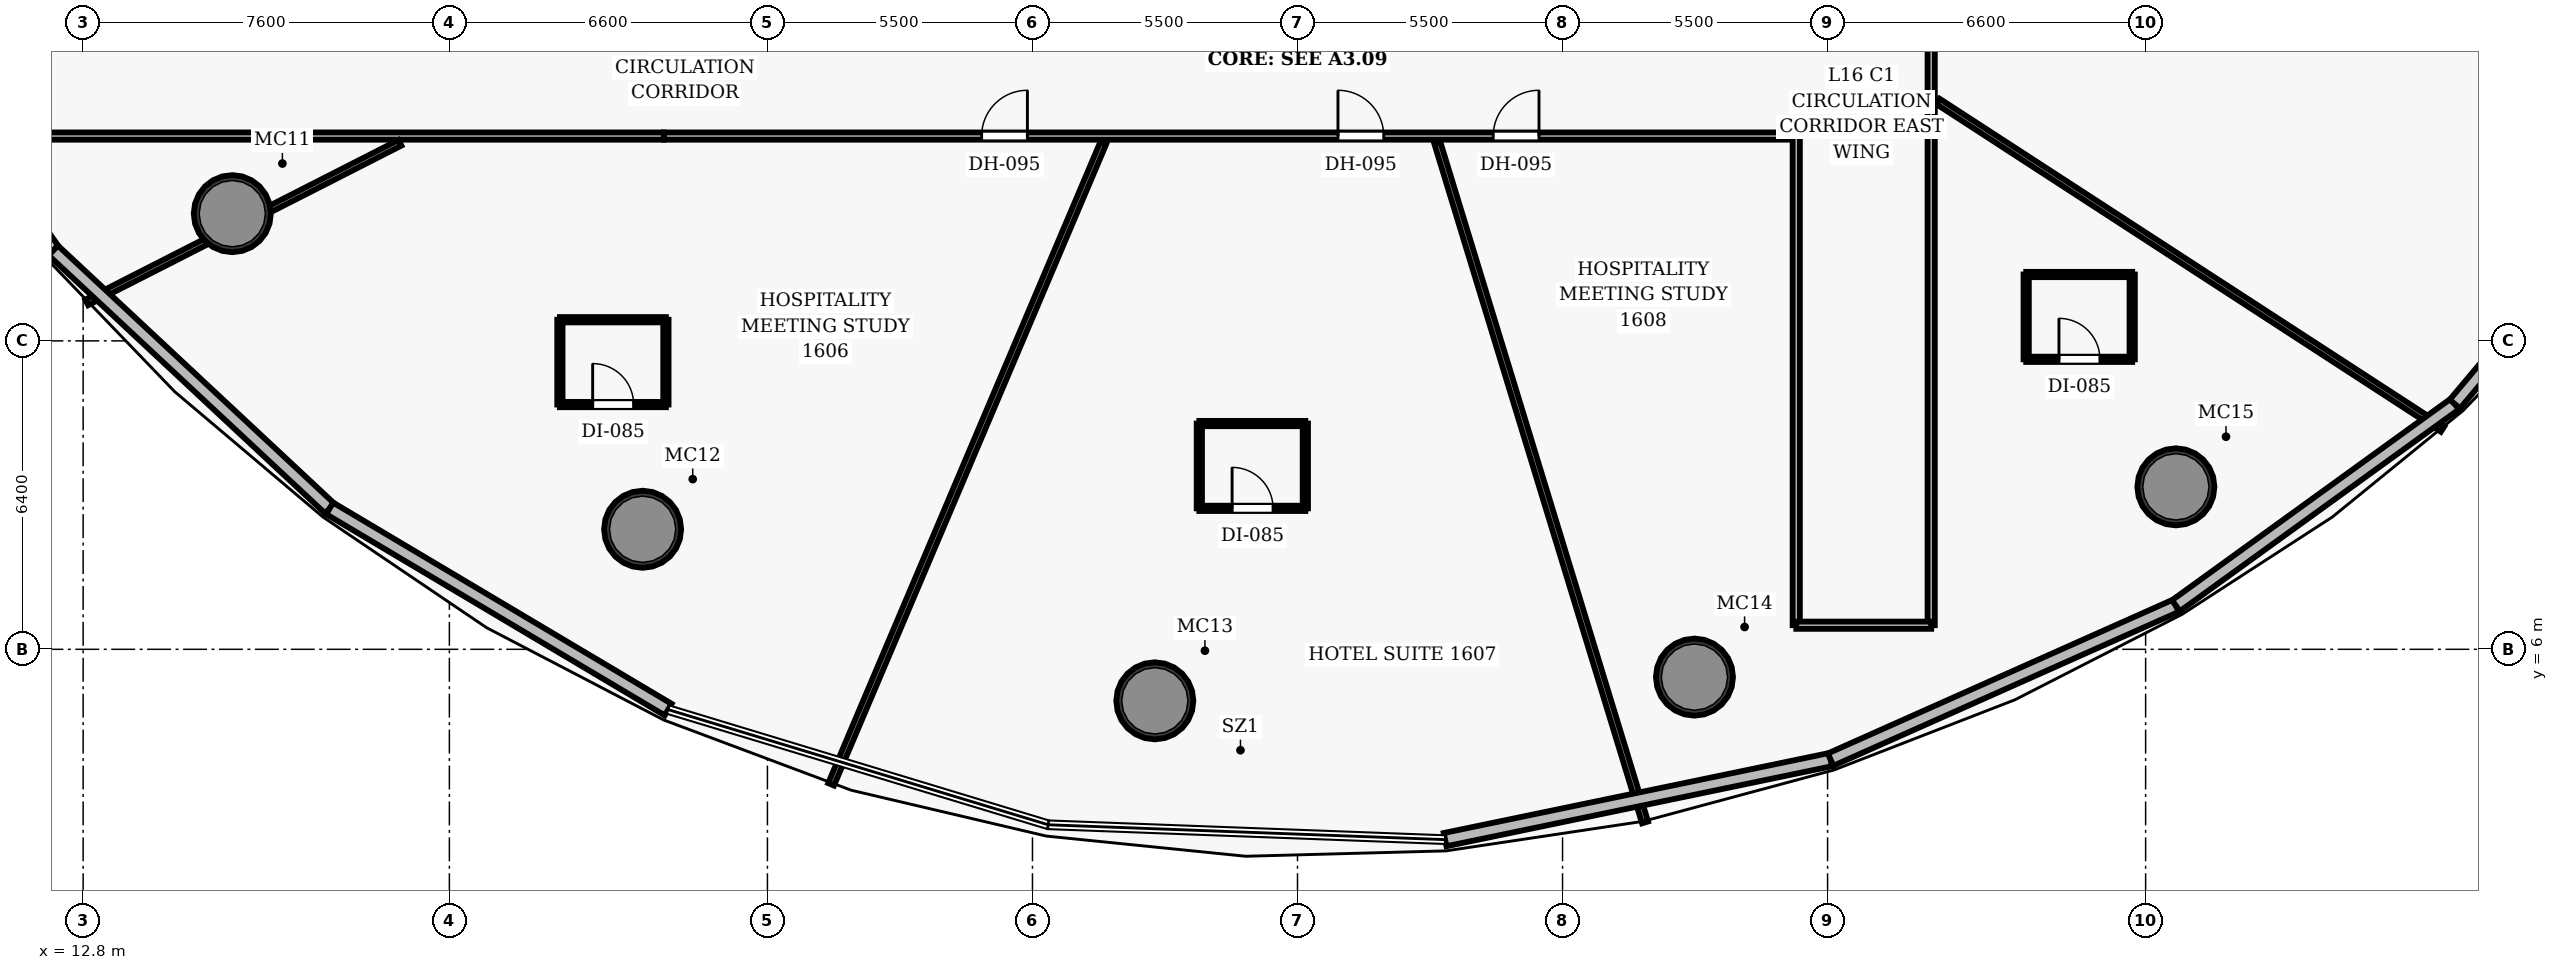
"""IFC4 building model, lengths in metres.
Left out: names, types, materials, properties, quantities, classifications, styles, units other than length and angle.
Written with IfcOpenShell. Run it as: python <this file> out.ifc"""

import sys

from ifc_helpers import new_model, si_unit, direction, frame, frame_2d, origin, origin_2d, place, context, subcontext, project, spatial, rectangle, hollow_circle, extrude, element, fill, save


model = new_model("IFC4")
c1 = context("Model", 3, precision=1e-05, world=origin(), true_north=direction((0.0, 1.0)))
c2 = subcontext(c1, "Body", "Model", "MODEL_VIEW")
j1 = project(units=[si_unit("LENGTHUNIT", "METRE"), si_unit("PLANEANGLEUNIT", "RADIAN")], contexts=[c1])
p1 = place(None, origin())
s1 = spatial("IfcSite", under=j1, at=p1, CompositionType="ELEMENT")
p2 = place(p1, origin())
s2 = spatial("IfcBuilding", under=s1, at=p2, CompositionType="ELEMENT")
p3 = place(p2, frame((0.0, 0.0, 72.9)))
s3 = spatial("IfcBuildingStorey", under=s2, at=p3, CompositionType="ELEMENT", Elevation=72.9)
for number, where, z_axis, x_axis in (
    (1, (15.895, 15.04, 0.0), (0.0, 0.0, 1.0), (1.0, 0.0, 0.0)),
    (2, (24.41, 8.491, 0.0), (0.0, 0.0, 1.0), (1.0, 0.0, 0.0)),
    (3, (35.039, 4.931, 0.0), (0.0, 0.0, 1.0), (1.0, 0.0, 0.0)),
    (4, (46.238, 5.423, 0.0), (0.0, 0.0, 1.0), (1.0, 0.0, 0.0)),
    (5, (56.228, 9.371, 0.0), (0.0, 0.0, 1.0), (1.0, 0.0, 0.0)),
):
    element("IfcColumn", number, at=place(p3, frame(where, z_axis=z_axis, x_axis=x_axis)), inside=s3, PredefinedType="COLUMN", context=c2, shape_type="SweptSolid", body=[
        extrude(hollow_circle(Radius=0.8, WallThickness=0.06, at=origin_2d()), origin(), (0.0, 0.0, 1.0), 3.5),
    ])
p4 = place(p3, frame((24.85, 16.65, 0.0), z_axis=(0.0, 0.0, 1.0), x_axis=(1.0, 0.0, 0.0)))
e6 = element("IfcWall", 6, at=p4, inside=s3, PredefinedType="PARTITIONING", context=c2, shape_type="SweptSolid", body=[
    extrude(rectangle(XDim=23.5, YDim=0.15, at=frame_2d((11.75, 0.0))), origin(), (0.0, 0.0, 1.0), 2.6),
])
p5 = place(p4, frame((6.595, 0.0, 0.0)))
e7 = element("IfcOpeningElement", 7, at=p5, cuts=e6, PredefinedType="OPENING", context=c2, shape_type="SweptSolid", body=[
    extrude(rectangle(XDim=0.95, YDim=2.15, at=frame_2d((0.475, 1.075))), frame((0.0, 0.085, 0.0), z_axis=(0.0, -1.0, 0.0), x_axis=(1.0, 0.0, 0.0)), (0.0, 0.0, 1.0), 0.17),
])
p6 = place(p4, frame((13.99, 0.0, 0.0)))
e8 = element("IfcOpeningElement", 8, at=p6, cuts=e6, PredefinedType="OPENING", context=c2, shape_type="SweptSolid", body=[
    extrude(rectangle(XDim=0.95, YDim=2.15, at=frame_2d((0.475, 1.075))), frame((0.0, 0.085, 0.0), z_axis=(0.0, -1.0, 0.0), x_axis=(1.0, 0.0, 0.0)), (0.0, 0.0, 1.0), 0.17),
])
p7 = place(p4, frame((17.211, 0.0, 0.0)))
e9 = element("IfcOpeningElement", 9, at=p7, cuts=e6, PredefinedType="OPENING", context=c2, shape_type="SweptSolid", body=[
    extrude(rectangle(XDim=0.95, YDim=2.15, at=frame_2d((0.475, 1.075))), frame((0.0, 0.085, 0.0), z_axis=(0.0, -1.0, 0.0), x_axis=(1.0, 0.0, 0.0)), (0.0, 0.0, 1.0), 0.17),
])
p8 = place(p3, frame((51.15, 16.65, 0.0), z_axis=(0.0, 0.0, 1.0), x_axis=(0.0, 1.0, 0.0)))
e10 = element("IfcWall", 10, at=p8, inside=s3, PredefinedType="PARTITIONING", context=c2, shape_type="SweptSolid", body=[
    extrude(rectangle(XDim=15.9, YDim=0.15, at=frame_2d((7.95, 0.0))), origin(), (0.0, 0.0, 1.0), 2.6),
])
p9 = place(p8, frame((11.512, 0.0, 0.0)))
e11 = element("IfcOpeningElement", 11, at=p9, cuts=e10, PredefinedType="OPENING", context=c2, shape_type="SweptSolid", body=[
    extrude(rectangle(XDim=0.95, YDim=2.15, at=frame_2d((0.475, 1.075))), frame((0.0, 0.085, 0.0), z_axis=(0.0, -1.0, 0.0), x_axis=(1.0, 0.0, 0.0)), (0.0, 0.0, 1.0), 0.17),
])
p10 = place(p8, frame((7.004, 0.0, 0.0)))
e12 = element("IfcOpeningElement", 12, at=p10, cuts=e10, PredefinedType="OPENING", context=c2, shape_type="SweptSolid", body=[
    extrude(rectangle(XDim=0.95, YDim=2.15, at=frame_2d((0.475, 1.075))), frame((0.0, 0.085, 0.0), z_axis=(0.0, -1.0, 0.0), x_axis=(1.0, 0.0, 0.0)), (0.0, 0.0, 1.0), 0.17),
])
p11 = place(p3, frame((11.124, 16.65, 0.0), z_axis=(0.0, 0.0, 1.0), x_axis=(1.0, 0.0, 0.0)))
e13 = element("IfcWall", 13, at=p11, inside=s3, PredefinedType="PARTITIONING", context=c2, shape_type="SweptSolid", body=[
    extrude(rectangle(XDim=13.726, YDim=0.15, at=frame_2d((6.863, 0.0))), origin(), (0.0, 0.0, 1.0), 2.6),
])
for number, where, z_axis, x_axis in (
    (14, (48.35, 6.5, 0.0), (0.0, 0.0, 1.0), (0.0, 1.0, 0.0)),
    (15, (51.15, 6.5, 0.0), (0.0, 0.0, 1.0), (0.0, 1.0, 0.0)),
):
    element("IfcWall", number, at=place(p3, frame(where, z_axis=z_axis, x_axis=x_axis)), inside=s3, PredefinedType="PARTITIONING", context=c2, shape_type="SweptSolid", body=[
        extrude(rectangle(XDim=10.15, YDim=0.15, at=frame_2d((5.075, 0.0))), origin(), (0.0, 0.0, 1.0), 2.6),
    ])
p12 = place(p3, frame((48.35, 6.5, 0.0), z_axis=(0.0, 0.0, 1.0), x_axis=(1.0, 0.0, 0.0)))
e16 = element("IfcWall", 16, at=p12, inside=s3, PredefinedType="PARTITIONING", context=c2, shape_type="SweptSolid", body=[
    extrude(rectangle(XDim=2.8, YDim=0.15, at=frame_2d((1.4, 0.0))), origin(), (0.0, 0.0, 1.0), 2.6),
])
p13 = place(p3, frame((19.375, 16.51, 0.0), z_axis=(0.0, 0.0, 1.0), x_axis=(-0.891001184566, -0.454000979185, 0.0)))
e17 = element("IfcWall", 17, at=p13, inside=s3, PredefinedType="PARTITIONING", context=c2, shape_type="SweptSolid", body=[
    extrude(rectangle(XDim=7.295, YDim=0.13, at=frame_2d((3.647, 0.0))), origin(), (0.0, 0.0, 1.0), 2.6),
])
p14 = place(p3, frame((33.972, 16.51, 0.0), z_axis=(0.0, 0.0, 1.0), x_axis=(-0.390718056451, -0.920510402094, 0.0)))
e18 = element("IfcWall", 18, at=p14, inside=s3, PredefinedType="PARTITIONING", context=c2, shape_type="SweptSolid", body=[
    extrude(rectangle(XDim=14.462, YDim=0.13, at=frame_2d((7.231, 0.0))), origin(), (0.0, 0.0, 1.0), 2.6),
])
p15 = place(p3, frame((40.901, 16.51, 0.0), z_axis=(0.0, 0.0, 1.0), x_axis=(0.292367012645, -0.956306190463, 0.0)))
e19 = element("IfcWall", 19, at=p15, inside=s3, PredefinedType="PARTITIONING", context=c2, shape_type="SweptSolid", body=[
    extrude(rectangle(XDim=14.746, YDim=0.13, at=frame_2d((7.373, 0.0))), origin(), (0.0, 0.0, 1.0), 2.6),
])
p16 = place(p3, frame((51.29, 17.369, 0.0), z_axis=(0.0, 0.0, 1.0), x_axis=(0.838674055508, -0.544633664602, 0.0)))
e20 = element("IfcWall", 20, at=p16, inside=s3, PredefinedType="PARTITIONING", context=c2, shape_type="SweptSolid", body=[
    extrude(rectangle(XDim=12.486, YDim=0.13, at=frame_2d((6.243, 0.0))), origin(), (0.0, 0.0, 1.0), 2.6),
])
p17 = place(p3, frame((22.693, 11.079, 0.0), z_axis=(0.0, 0.0, 1.0), x_axis=(1.0, 0.0, 0.0)))
e21 = element("IfcWall", 21, at=p17, inside=s3, PredefinedType="PARTITIONING", context=c2, shape_type="SweptSolid", body=[
    extrude(rectangle(XDim=2.2, YDim=0.11, at=frame_2d((1.1, 0.0))), origin(), (0.0, 0.0, 1.0), 2.6),
])
p18 = place(p17, frame((0.68, 0.0, 0.0)))
e22 = element("IfcOpeningElement", 22, at=p18, cuts=e21, PredefinedType="OPENING", context=c2, shape_type="SweptSolid", body=[
    extrude(rectangle(XDim=0.85, YDim=2.1, at=frame_2d((0.425, 1.05))), frame((0.0, 0.065, 0.0), z_axis=(0.0, -1.0, 0.0), x_axis=(1.0, 0.0, 0.0)), (0.0, 0.0, 1.0), 0.13),
])
p19 = place(p3, frame((22.693, 12.839, 0.0), z_axis=(0.0, 0.0, 1.0), x_axis=(1.0, 0.0, 0.0)))
e23 = element("IfcWall", 23, at=p19, inside=s3, PredefinedType="PARTITIONING", context=c2, shape_type="SweptSolid", body=[
    extrude(rectangle(XDim=2.2, YDim=0.11, at=frame_2d((1.1, 0.0))), origin(), (0.0, 0.0, 1.0), 2.6),
])
for number, where, z_axis, x_axis in (
    (24, (22.693, 11.079, 0.0), (0.0, 0.0, 1.0), (0.0, 1.0, 0.0)),
    (25, (24.893, 11.079, 0.0), (0.0, 0.0, 1.0), (0.0, 1.0, 0.0)),
):
    element("IfcWall", number, at=place(p3, frame(where, z_axis=z_axis, x_axis=x_axis)), inside=s3, PredefinedType="PARTITIONING", context=c2, shape_type="SweptSolid", body=[
        extrude(rectangle(XDim=1.76, YDim=0.11, at=frame_2d((0.88, 0.0))), origin(), (0.0, 0.0, 1.0), 2.6),
    ])
p20 = place(p3, frame((35.963, 8.925, 0.0), z_axis=(0.0, 0.0, 1.0), x_axis=(1.0, 0.0, 0.0)))
e26 = element("IfcWall", 26, at=p20, inside=s3, PredefinedType="PARTITIONING", context=c2, shape_type="SweptSolid", body=[
    extrude(rectangle(XDim=2.2, YDim=0.11, at=frame_2d((1.1, 0.0))), origin(), (0.0, 0.0, 1.0), 2.6),
])
p21 = place(p20, frame((0.68, 0.0, 0.0)))
e27 = element("IfcOpeningElement", 27, at=p21, cuts=e26, PredefinedType="OPENING", context=c2, shape_type="SweptSolid", body=[
    extrude(rectangle(XDim=0.85, YDim=2.1, at=frame_2d((0.425, 1.05))), frame((0.0, 0.065, 0.0), z_axis=(0.0, -1.0, 0.0), x_axis=(1.0, 0.0, 0.0)), (0.0, 0.0, 1.0), 0.13),
])
p22 = place(p3, frame((35.963, 10.685, 0.0), z_axis=(0.0, 0.0, 1.0), x_axis=(1.0, 0.0, 0.0)))
e28 = element("IfcWall", 28, at=p22, inside=s3, PredefinedType="PARTITIONING", context=c2, shape_type="SweptSolid", body=[
    extrude(rectangle(XDim=2.2, YDim=0.11, at=frame_2d((1.1, 0.0))), origin(), (0.0, 0.0, 1.0), 2.6),
])
for number, where, z_axis, x_axis in (
    (29, (35.963, 8.925, 0.0), (0.0, 0.0, 1.0), (0.0, 1.0, 0.0)),
    (30, (38.163, 8.925, 0.0), (0.0, 0.0, 1.0), (0.0, 1.0, 0.0)),
):
    element("IfcWall", number, at=place(p3, frame(where, z_axis=z_axis, x_axis=x_axis)), inside=s3, PredefinedType="PARTITIONING", context=c2, shape_type="SweptSolid", body=[
        extrude(rectangle(XDim=1.76, YDim=0.11, at=frame_2d((0.88, 0.0))), origin(), (0.0, 0.0, 1.0), 2.6),
    ])
p23 = place(p3, frame((53.122, 12.017, 0.0), z_axis=(0.0, 0.0, 1.0), x_axis=(1.0, 0.0, 0.0)))
e31 = element("IfcWall", 31, at=p23, inside=s3, PredefinedType="PARTITIONING", context=c2, shape_type="SweptSolid", body=[
    extrude(rectangle(XDim=2.2, YDim=0.11, at=frame_2d((1.1, 0.0))), origin(), (0.0, 0.0, 1.0), 2.6),
])
p24 = place(p23, frame((0.68, 0.0, 0.0)))
e32 = element("IfcOpeningElement", 32, at=p24, cuts=e31, PredefinedType="OPENING", context=c2, shape_type="SweptSolid", body=[
    extrude(rectangle(XDim=0.85, YDim=2.1, at=frame_2d((0.425, 1.05))), frame((0.0, 0.065, 0.0), z_axis=(0.0, -1.0, 0.0), x_axis=(1.0, 0.0, 0.0)), (0.0, 0.0, 1.0), 0.13),
])
p25 = place(p3, frame((53.122, 13.777, 0.0), z_axis=(0.0, 0.0, 1.0), x_axis=(1.0, 0.0, 0.0)))
e33 = element("IfcWall", 33, at=p25, inside=s3, PredefinedType="PARTITIONING", context=c2, shape_type="SweptSolid", body=[
    extrude(rectangle(XDim=2.2, YDim=0.11, at=frame_2d((1.1, 0.0))), origin(), (0.0, 0.0, 1.0), 2.6),
])
for number, where, z_axis, x_axis in (
    (34, (53.122, 12.017, 0.0), (0.0, 0.0, 1.0), (0.0, 1.0, 0.0)),
    (35, (55.322, 12.017, 0.0), (0.0, 0.0, 1.0), (0.0, 1.0, 0.0)),
):
    element("IfcWall", number, at=place(p3, frame(where, z_axis=z_axis, x_axis=x_axis)), inside=s3, PredefinedType="PARTITIONING", context=c2, shape_type="SweptSolid", body=[
        extrude(rectangle(XDim=1.76, YDim=0.11, at=frame_2d((0.88, 0.0))), origin(), (0.0, 0.0, 1.0), 2.6),
    ])
p26 = place(p3, frame((12.18, 14.276, 0.0), z_axis=(0.0, 0.0, 1.0), x_axis=(-0.575543356888, 0.817771266518, 0.0)))
e36 = element("IfcWall", 36, at=p26, inside=s3, PredefinedType="SOLIDWALL", context=c2, shape_type="SweptSolid", body=[
    extrude(rectangle(XDim=7.143, YDim=0.28, at=frame_2d((3.572, 0.0))), origin(), (0.0, 0.0, 1.0), 3.25),
])
p27 = place(p3, frame((17.916, 8.924, 0.0), z_axis=(0.0, 0.0, 1.0), x_axis=(-0.731144262125, 0.682222887304, 0.0)))
e37 = element("IfcWall", 37, at=p27, inside=s3, PredefinedType="SOLIDWALL", context=c2, shape_type="SweptSolid", body=[
    extrude(rectangle(XDim=7.845, YDim=0.28, at=frame_2d((3.922, 0.0))), origin(), (0.0, 0.0, 1.0), 3.25),
])
p28 = place(p3, frame((24.94, 4.749, 0.0), z_axis=(0.0, 0.0, 1.0), x_axis=(-0.859626337848, 0.510923242061, 0.0)))
e38 = element("IfcWall", 38, at=p28, inside=s3, PredefinedType="SOLIDWALL", context=c2, shape_type="SweptSolid", body=[
    extrude(rectangle(XDim=8.171, YDim=0.28, at=frame_2d((4.085, 0.0))), origin(), (0.0, 0.0, 1.0), 3.25),
])
p29 = place(p3, frame((49.063, 3.711, 0.0), z_axis=(0.0, 0.0, 1.0), x_axis=(-0.979128564845, -0.203241859626, 0.0)))
e39 = element("IfcWall", 39, at=p29, inside=s3, PredefinedType="SOLIDWALL", context=c2, shape_type="SweptSolid", body=[
    extrude(rectangle(XDim=8.171, YDim=0.28, at=frame_2d((4.085, 0.0))), origin(), (0.0, 0.0, 1.0), 3.25),
])
p30 = place(p3, frame((56.229, 6.905, 0.0), z_axis=(0.0, 0.0, 1.0), x_axis=(-0.913417139833, -0.407024727331, 0.0)))
e40 = element("IfcWall", 40, at=p30, inside=s3, PredefinedType="SOLIDWALL", context=c2, shape_type="SweptSolid", body=[
    extrude(rectangle(XDim=7.845, YDim=0.28, at=frame_2d((3.922, 0.0))), origin(), (0.0, 0.0, 1.0), 3.25),
])
p31 = place(p3, frame((62.018, 11.089, 0.0), z_axis=(0.0, 0.0, 1.0), x_axis=(-0.810429498951, -0.585836177809, 0.0)))
e41 = element("IfcWall", 41, at=p31, inside=s3, PredefinedType="SOLIDWALL", context=c2, shape_type="SweptSolid", body=[
    extrude(rectangle(XDim=7.143, YDim=0.28, at=frame_2d((3.571, 0.0))), origin(), (0.0, 0.0, 1.0), 3.25),
])
p32 = place(p3, frame((66.012, 15.846, 0.0), z_axis=(0.0, 0.0, 1.0), x_axis=(-0.643067644566, -0.765809378705, 0.0)))
e42 = element("IfcWall", 42, at=p32, inside=s3, PredefinedType="SOLIDWALL", context=c2, shape_type="SweptSolid", body=[
    extrude(rectangle(XDim=6.212, YDim=0.28, at=frame_2d((3.106, 0.0))), origin(), (0.0, 0.0, 1.0), 3.25),
])
p33 = place(p5, origin())
e43 = element("IfcDoor", 43, at=p33, inside=s3, OperationType="SINGLE_SWING_RIGHT", PredefinedType="DOOR", context=c2, shape_type="SweptSolid", body=[
    extrude(rectangle(XDim=0.95, YDim=2.15, at=frame_2d((0.475, 1.075))), frame((0.0, 0.025, 0.0), z_axis=(0.0, -1.0, 0.0), x_axis=(1.0, 0.0, 0.0)), (0.0, 0.0, 1.0), 0.05),
])
fill(e7, e43)
p34 = place(p18, origin())
e44 = element("IfcDoor", 44, at=p34, inside=s3, OperationType="SINGLE_SWING_LEFT", PredefinedType="DOOR", context=c2, shape_type="SweptSolid", body=[
    extrude(rectangle(XDim=0.85, YDim=2.1, at=frame_2d((0.425, 1.05))), frame((0.0, 0.025, 0.0), z_axis=(0.0, -1.0, 0.0), x_axis=(1.0, 0.0, 0.0)), (0.0, 0.0, 1.0), 0.05),
])
fill(e22, e44)
p35 = place(p6, origin())
e45 = element("IfcDoor", 45, at=p35, inside=s3, OperationType="SINGLE_SWING_LEFT", PredefinedType="DOOR", context=c2, shape_type="SweptSolid", body=[
    extrude(rectangle(XDim=0.95, YDim=2.15, at=frame_2d((0.475, 1.075))), frame((0.0, 0.025, 0.0), z_axis=(0.0, -1.0, 0.0), x_axis=(1.0, 0.0, 0.0)), (0.0, 0.0, 1.0), 0.05),
])
fill(e8, e45)
p36 = place(p21, origin())
e46 = element("IfcDoor", 46, at=p36, inside=s3, OperationType="SINGLE_SWING_LEFT", PredefinedType="DOOR", context=c2, shape_type="SweptSolid", body=[
    extrude(rectangle(XDim=0.85, YDim=2.1, at=frame_2d((0.425, 1.05))), frame((0.0, 0.025, 0.0), z_axis=(0.0, -1.0, 0.0), x_axis=(1.0, 0.0, 0.0)), (0.0, 0.0, 1.0), 0.05),
])
fill(e27, e46)
p37 = place(p7, origin())
e47 = element("IfcDoor", 47, at=p37, inside=s3, OperationType="SINGLE_SWING_RIGHT", PredefinedType="DOOR", context=c2, shape_type="SweptSolid", body=[
    extrude(rectangle(XDim=0.95, YDim=2.15, at=frame_2d((0.475, 1.075))), frame((0.0, 0.025, 0.0), z_axis=(0.0, -1.0, 0.0), x_axis=(1.0, 0.0, 0.0)), (0.0, 0.0, 1.0), 0.05),
])
fill(e9, e47)
p38 = place(p24, origin())
e48 = element("IfcDoor", 48, at=p38, inside=s3, OperationType="SINGLE_SWING_LEFT", PredefinedType="DOOR", context=c2, shape_type="SweptSolid", body=[
    extrude(rectangle(XDim=0.85, YDim=2.1, at=frame_2d((0.425, 1.05))), frame((0.0, 0.025, 0.0), z_axis=(0.0, -1.0, 0.0), x_axis=(1.0, 0.0, 0.0)), (0.0, 0.0, 1.0), 0.05),
])
fill(e32, e48)
save(model, sys.argv[1])
